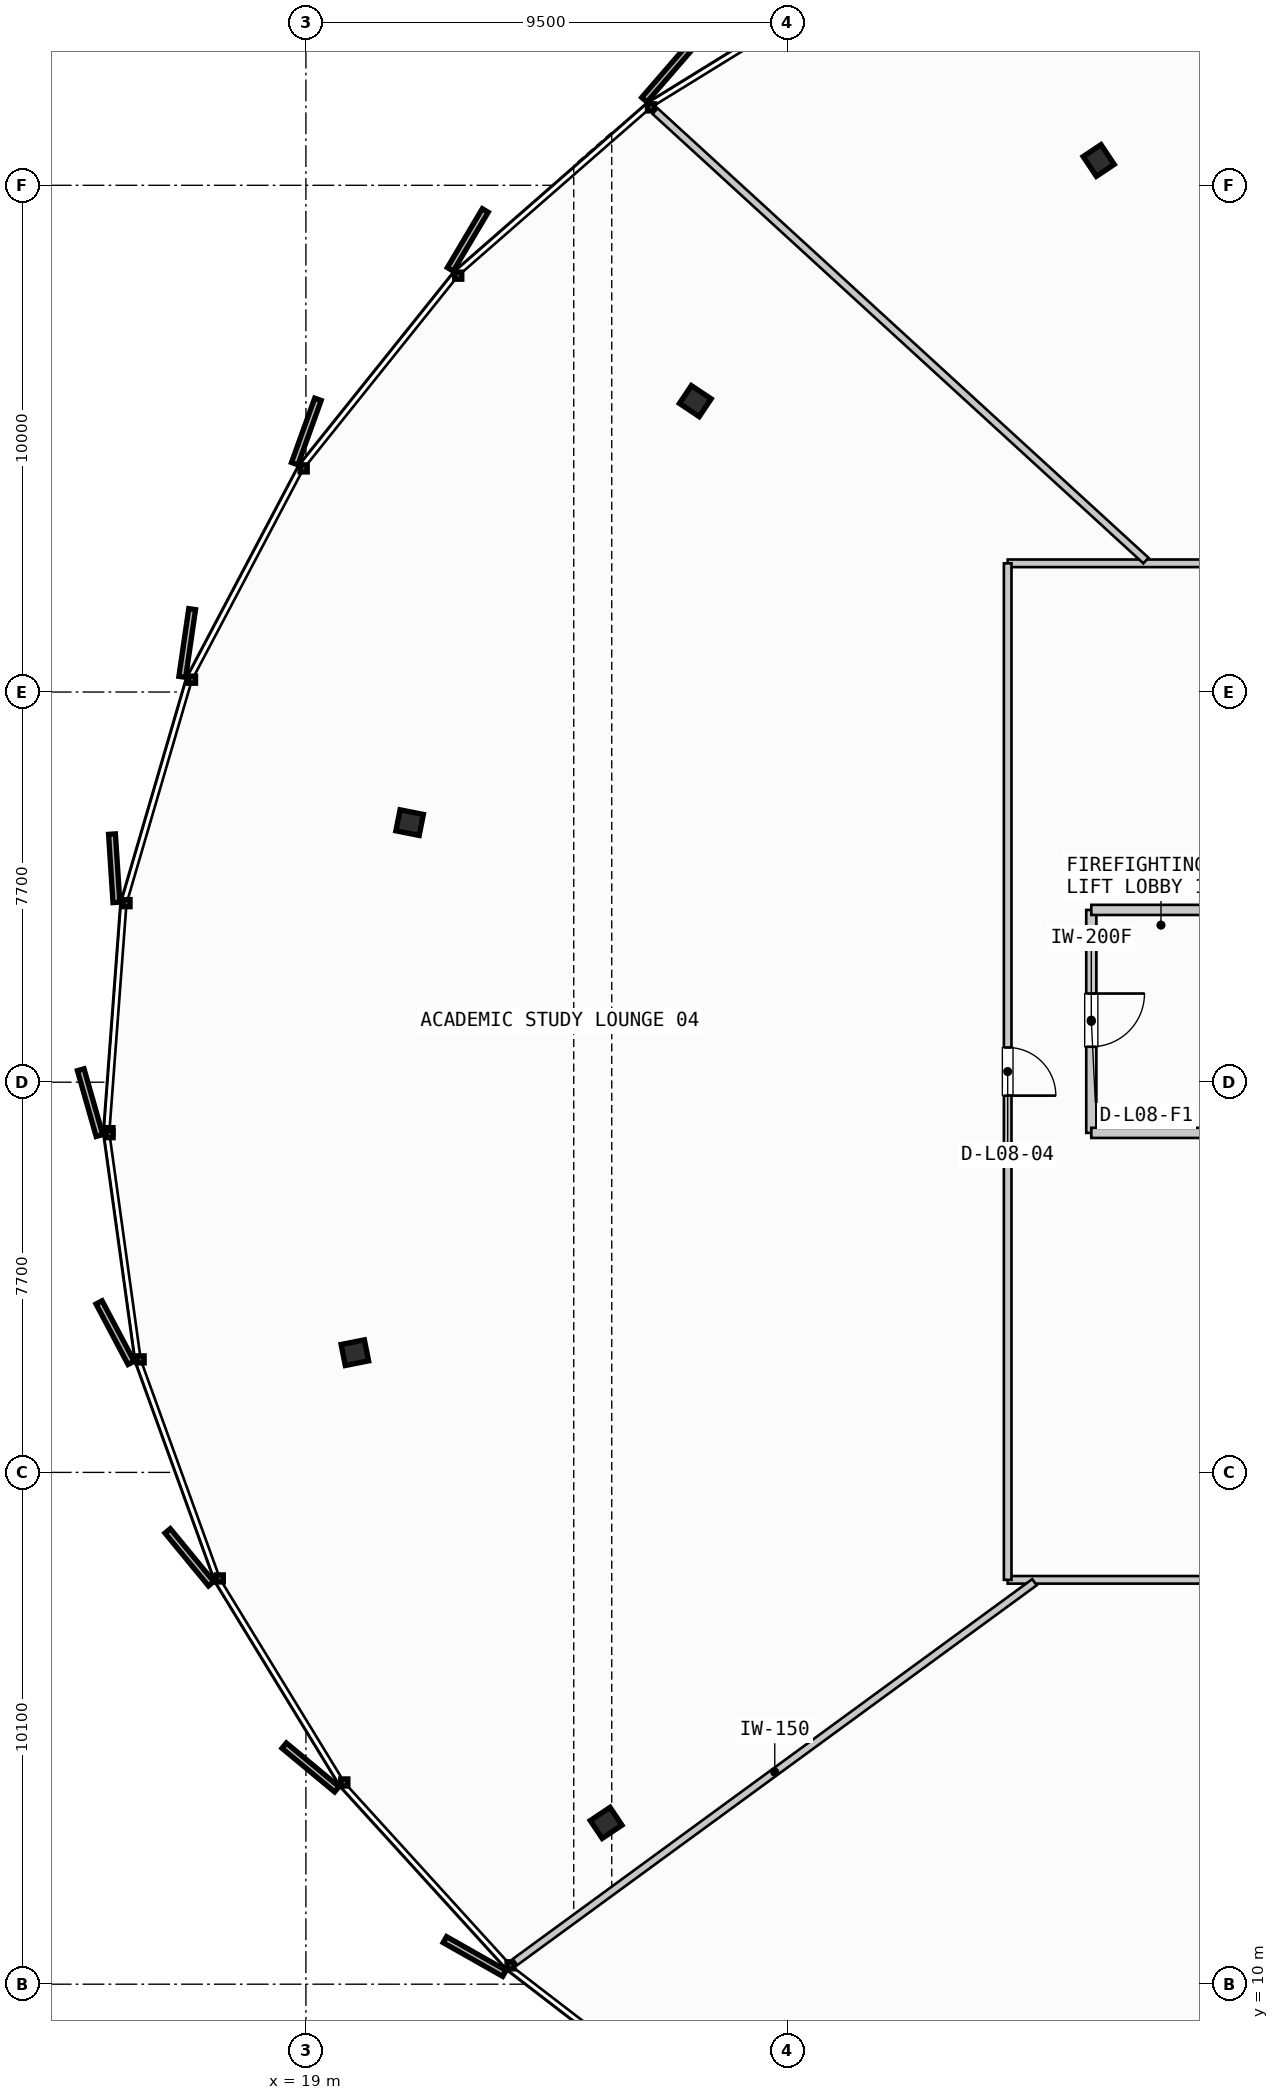
"""IFC4 building model, lengths in metres.
Left out: names, types, materials, properties, quantities, classifications, styles, units other than length and angle.
Written with IfcOpenShell. Run it as: python <this file> out.ifc"""

import sys

from ifc_helpers import new_model, si_unit, direction, frame, frame_2d, origin, origin_2d, place, context, subcontext, project, spatial, rectangle, i_section, extrude, source, transform, mapped, element, fill, save


model = new_model("IFC4")
c1 = context("Model", 3, precision=1e-05, world=origin(), true_north=direction((0.0, 1.0)))
c2 = subcontext(c1, "Body", "Model", "MODEL_VIEW")
j1 = project(units=[si_unit("LENGTHUNIT", "METRE"), si_unit("PLANEANGLEUNIT", "RADIAN")], contexts=[c1])
p1 = place(None, origin())
s1 = spatial("IfcSite", under=j1, at=p1, CompositionType="ELEMENT")
p2 = place(p1, origin())
s2 = spatial("IfcBuilding", under=s1, at=p2, CompositionType="ELEMENT")
p3 = place(p2, frame((0.0, 0.0, 37.2)))
s3 = spatial("IfcBuildingStorey", under=s2, at=p3, CompositionType="ELEMENT", Elevation=37.2)
m1 = source(origin(), c2, "Body", "SweptSolid", [
    extrude(i_section(OverallWidth=0.423, OverallDepth=0.469, WebThickness=0.051, FlangeThickness=0.081, FilletRadius=0.015, at=origin_2d()), origin(), (0.0, 0.0, 1.0), 3.55),
])
for number, where, z_axis, x_axis in (
    (1, (34.646, 45.99, 0.0), (0.0, 0.0, 1.0), (-0.556, 0.831, 0.0)),
    (2, (26.685, 41.241, 0.0), (0.0, 0.0, 1.0), (-0.831, 0.556, 0.0)),
    (3, (21.047, 32.923, 0.0), (0.0, 0.0, 1.0), (-0.981, 0.195, 0.0)),
    (4, (19.966, 22.462, 0.0), (0.0, 0.0, 1.0), (-0.981, -0.195, 0.0)),
    (5, (24.925, 13.183, 0.0), (0.0, 0.0, 1.0), (-0.831, -0.556, 0.0)),
):
    element("IfcColumn", number, at=place(p3, frame(where, z_axis=z_axis, x_axis=x_axis)), inside=s3, PredefinedType="COLUMN", context=c2, shape_type="MappedRepresentation", body=[
        mapped(m1, transform((0.0, 0.0, 0.0), scale=1.0)),
    ])
p4 = place(p3, frame((34.5, 31.2, 0.0), z_axis=(0.0, 0.0, 1.0), x_axis=(0.0, -1.0, 0.0)))
e6 = element("IfcWall", 6, at=p4, inside=s3, PredefinedType="PARTITIONING", context=c2, shape_type="SweptSolid", body=[
    extrude(rectangle(XDim=4.4, YDim=0.2, at=frame_2d((2.2, 0.0))), origin(), (0.0, 0.0, 1.0), 2.925),
])
p5 = place(p4, frame((1.65, 0.0, 0.0)))
e7 = element("IfcOpeningElement", 7, at=p5, cuts=e6, PredefinedType="OPENING", context=c2, shape_type="SweptSolid", body=[
    extrude(rectangle(XDim=1.05, YDim=2.15, at=frame_2d((0.525, 1.075))), frame((0.0, 0.11, 0.0), z_axis=(0.0, -1.0, 0.0), x_axis=(1.0, 0.0, 0.0)), (0.0, 0.0, 1.0), 0.22),
])
for number, where, z_axis, x_axis in (
    (8, (34.5, 26.8, 0.0), (0.0, 0.0, 1.0), (1.0, 0.0, 0.0)),
    (9, (34.5, 31.2, 0.0), (0.0, 0.0, 1.0), (1.0, 0.0, 0.0)),
):
    element("IfcWall", number, at=place(p3, frame(where, z_axis=z_axis, x_axis=x_axis)), inside=s3, PredefinedType="PARTITIONING", context=c2, shape_type="SweptSolid", body=[
        extrude(rectangle(XDim=3.14, YDim=0.2, at=frame_2d((1.57, 0.0))), origin(), (0.0, 0.0, 1.0), 2.925),
    ])
p6 = place(p3, frame((32.85, 17.98, 0.0), z_axis=(0.0, 0.0, 1.0), x_axis=(1.0, 0.0, 0.0)))
e10 = element("IfcWall", 10, at=p6, inside=s3, PredefinedType="PARTITIONING", context=c2, shape_type="SweptSolid", body=[
    extrude(rectangle(XDim=28.42, YDim=0.15, at=frame_2d((14.21, 0.0))), origin(), (0.0, 0.0, 1.0), 2.925),
])
p7 = place(p6, frame((12.271, 0.0, 0.0)))
e11 = element("IfcOpeningElement", 11, at=p7, cuts=e10, PredefinedType="OPENING", context=c2, shape_type="SweptSolid", body=[
    extrude(rectangle(XDim=0.95, YDim=2.15, at=frame_2d((0.475, 1.075))), frame((0.0, 0.085, 0.0), z_axis=(0.0, -1.0, 0.0), x_axis=(1.0, 0.0, 0.0)), (0.0, 0.0, 1.0), 0.17),
])
p8 = place(p3, frame((61.27, 38.04, 0.0), z_axis=(0.0, 0.0, 1.0), x_axis=(-1.0, 0.0, 0.0)))
e12 = element("IfcWall", 12, at=p8, inside=s3, PredefinedType="PARTITIONING", context=c2, shape_type="SweptSolid", body=[
    extrude(rectangle(XDim=28.42, YDim=0.15, at=frame_2d((14.21, 0.0))), origin(), (0.0, 0.0, 1.0), 2.925),
])
p9 = place(p8, frame((12.698, 0.0, 0.0)))
e13 = element("IfcOpeningElement", 13, at=p9, cuts=e12, PredefinedType="OPENING", context=c2, shape_type="SweptSolid", body=[
    extrude(rectangle(XDim=0.95, YDim=2.15, at=frame_2d((0.475, 1.075))), frame((0.0, 0.085, 0.0), z_axis=(0.0, -1.0, 0.0), x_axis=(1.0, 0.0, 0.0)), (0.0, 0.0, 1.0), 0.17),
])
p10 = place(p3, frame((32.85, 38.04, 0.0), z_axis=(0.0, 0.0, 1.0), x_axis=(0.0, -1.0, 0.0)))
e14 = element("IfcWall", 14, at=p10, inside=s3, PredefinedType="PARTITIONING", context=c2, shape_type="SweptSolid", body=[
    extrude(rectangle(XDim=20.06, YDim=0.15, at=frame_2d((10.03, 0.0))), origin(), (0.0, 0.0, 1.0), 2.925),
])
p11 = place(p10, frame((9.555, 0.0, 0.0)))
e15 = element("IfcOpeningElement", 15, at=p11, cuts=e14, PredefinedType="OPENING", context=c2, shape_type="SweptSolid", body=[
    extrude(rectangle(XDim=0.95, YDim=2.15, at=frame_2d((0.475, 1.075))), frame((0.0, 0.085, 0.0), z_axis=(0.0, -1.0, 0.0), x_axis=(1.0, 0.0, 0.0)), (0.0, 0.0, 1.0), 0.17),
])
p12 = place(p3, frame((33.378, 17.933, 0.0), z_axis=(0.0, 0.0, 1.0), x_axis=(-0.807215314331, -0.5902570934, 0.0)))
e16 = element("IfcWall", 16, at=p12, inside=s3, PredefinedType="PARTITIONING", context=c2, shape_type="SweptSolid", body=[
    extrude(rectangle(XDim=12.699, YDim=0.15, at=frame_2d((6.35, 0.0))), origin(), (0.0, 0.0, 1.0), 2.925),
])
p13 = place(p3, frame((35.579, 38.094, 0.0), z_axis=(0.0, 0.0, 1.0), x_axis=(-0.737564479252, 0.675276712871, 0.0)))
e17 = element("IfcWall", 17, at=p13, inside=s3, PredefinedType="PARTITIONING", context=c2, shape_type="SweptSolid", body=[
    extrude(rectangle(XDim=13.135, YDim=0.15, at=frame_2d((6.567, 0.0))), origin(), (0.0, 0.0, 1.0), 2.925),
])
m2 = source(origin(), c2, "Body", "SweptSolid", [
    extrude(rectangle(XDim=1.05, YDim=2.15, at=frame_2d((0.525, 1.075))), frame((0.0, 0.025, 0.0), z_axis=(0.0, -1.0, 0.0), x_axis=(1.0, 0.0, 0.0)), (0.0, 0.0, 1.0), 0.05),
])
p14 = place(p5, origin())
e18 = element("IfcDoor", 18, at=p14, inside=s3, OperationType="SINGLE_SWING_LEFT", PredefinedType="DOOR", context=c2, shape_type="MappedRepresentation", body=[
    mapped(m2, transform((0.0, 0.0, 0.0), scale=1.0)),
])
fill(e7, e18)
m3 = source(origin(), c2, "Body", "SweptSolid", [
    extrude(rectangle(XDim=0.95, YDim=2.15, at=frame_2d((0.475, 1.075))), frame((0.0, 0.025, 0.0), z_axis=(0.0, -1.0, 0.0), x_axis=(1.0, 0.0, 0.0)), (0.0, 0.0, 1.0), 0.05),
])
p15 = place(p11, origin())
e19 = element("IfcDoor", 19, at=p15, inside=s3, OperationType="SINGLE_SWING_RIGHT", PredefinedType="DOOR", context=c2, shape_type="MappedRepresentation", body=[
    mapped(m3, transform((0.0, 0.0, 0.0), scale=1.0)),
])
fill(e15, e19)
save(model, sys.argv[1])
